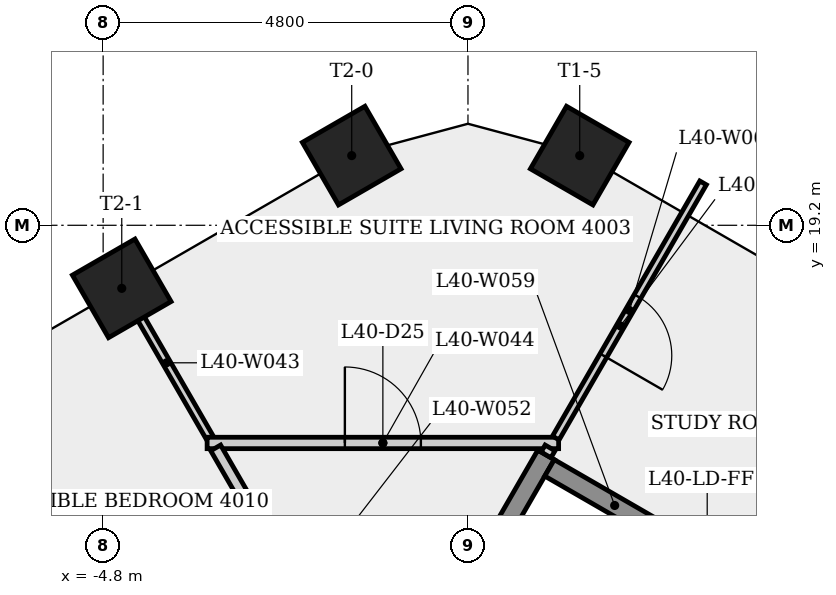
"""IFC4 building model, lengths in metres.
Left out: names, types, materials, properties, quantities, classifications, styles, units other than length and angle.
Written with IfcOpenShell. Run it as: python <this file> out.ifc"""

import sys

from ifc_helpers import new_model, si_unit, direction, frame, frame_2d, origin, origin_2d, place, context, subcontext, project, spatial, rectangle, extrude, element, fill, save


model = new_model("IFC4")
c1 = context("Model", 3, precision=1e-05, world=origin(), true_north=direction((0.0, 1.0)))
c2 = subcontext(c1, "Body", "Model", "MODEL_VIEW")
j1 = project(units=[si_unit("LENGTHUNIT", "METRE"), si_unit("PLANEANGLEUNIT", "RADIAN")], contexts=[c1])
p1 = place(None, origin())
s1 = spatial("IfcSite", under=j1, at=p1, CompositionType="ELEMENT")
p2 = place(p1, origin())
s2 = spatial("IfcBuilding", under=s1, at=p2, CompositionType="ELEMENT")
p3 = place(p2, frame((0.0, 0.0, 152.7)))
s3 = spatial("IfcBuildingStorey", under=s2, at=p3, CompositionType="ELEMENT", Elevation=152.7)
for number, where, z_axis, x_axis in (
    (1, (1.47, 20.117, 0.0), (0.0, 0.0, 1.0), (0.5, 0.866, 0.0)),
    (2, (-1.53, 20.117, 0.0), (0.0, 0.0, 1.0), (-0.5, 0.866, 0.0)),
    (3, (-4.555, 18.37, 0.0), (0.0, 0.0, 1.0), (-0.5, 0.866, 0.0)),
):
    element("IfcColumn", number, at=place(p3, frame(where, z_axis=z_axis, x_axis=x_axis)), inside=s3, PredefinedType="COLUMN", context=c2, shape_type="SweptSolid", body=[
        extrude(rectangle(XDim=0.95, YDim=0.95, at=origin_2d()), origin(), (0.0, 0.0, 1.0), 3.4),
    ])
p4 = place(p3, frame((-7.575, 16.627, 0.0), z_axis=(0.0, 0.0, 1.0), x_axis=(0.500011399757, -0.866018822032, 0.0)))
e4 = element("IfcWall", 4, at=p4, inside=s3, PredefinedType="PARTITIONING", context=c2, shape_type="SweptSolid", body=[
    extrude(rectangle(XDim=7.411, YDim=0.1, at=frame_2d((3.706, 0.0))), origin(), (0.0, 0.0, 1.0), 3.05),
])
p5 = place(p3, frame((-3.394, 16.401, 0.0), z_axis=(0.0, 0.0, 1.0), x_axis=(-0.500067608328, 0.865986366579, 0.0)))
e5 = element("IfcWall", 5, at=p5, inside=s3, PredefinedType="PARTITIONING", context=c2, shape_type="SweptSolid", body=[
    extrude(rectangle(XDim=2.286, YDim=0.1, at=frame_2d((1.143, 0.0))), origin(), (0.0, 0.0, 1.0), 3.05),
])
p6 = place(p3, frame((-3.432, 16.336, 0.0), z_axis=(0.0, 0.0, 1.0), x_axis=(1.0, 0.0, 0.0)))
e6 = element("IfcWall", 6, at=p6, inside=s3, PredefinedType="PARTITIONING", context=c2, shape_type="SweptSolid", body=[
    extrude(rectangle(XDim=4.625, YDim=0.15, at=frame_2d((2.312, 0.0))), origin(), (0.0, 0.0, 1.0), 3.05),
])
p7 = place(p6, frame((1.812, 0.0, 0.0)))
e7 = element("IfcOpeningElement", 7, at=p7, cuts=e6, PredefinedType="OPENING", context=c2, shape_type="SweptSolid", body=[
    extrude(rectangle(XDim=1.0, YDim=2.1, at=frame_2d((0.5, 1.05))), frame((0.0, 0.085, 0.0), z_axis=(0.0, -1.0, 0.0), x_axis=(1.0, 0.0, 0.0)), (0.0, 0.0, 1.0), 0.17),
])
p8 = place(p3, frame((-1.12, 12.461, 0.0), z_axis=(0.0, 0.0, 1.0), x_axis=(-0.499970631935, 0.866042358781, 0.0)))
e8 = element("IfcWall", 8, at=p8, inside=s3, PredefinedType="PARTITIONING", context=c2, shape_type="SweptSolid", body=[
    extrude(rectangle(XDim=4.4, YDim=0.15, at=frame_2d((2.2, 0.0))), origin(), (0.0, 0.0, 1.0), 3.05),
])
p9 = place(p8, frame((1.75, 0.0, 0.0)))
e9 = element("IfcOpeningElement", 9, at=p9, cuts=e8, PredefinedType="OPENING", context=c2, shape_type="SweptSolid", body=[
    extrude(rectangle(XDim=0.9, YDim=2.1, at=frame_2d((0.45, 1.05))), frame((0.0, 0.085, 0.0), z_axis=(0.0, -1.0, 0.0), x_axis=(1.0, 0.0, 0.0)), (0.0, 0.0, 1.0), 0.17),
])
p10 = place(p3, frame((-0.448, 13.624, 0.0), z_axis=(0.0, 0.0, 1.0), x_axis=(0.500037662692, 0.866003658127, 0.0)))
e10 = element("IfcWall", 10, at=p10, inside=s3, PredefinedType="SHEAR", context=c2, shape_type="SweptSolid", body=[
    extrude(rectangle(XDim=2.95, YDim=0.25, at=frame_2d((1.475, 0.0))), origin(), (0.0, 0.0, 1.0), 3.05),
])
p11 = place(p3, frame((1.073, 16.008, 0.0), z_axis=(0.0, 0.0, 1.0), x_axis=(0.866040211805, -0.499974350878, 0.0)))
e11 = element("IfcWall", 11, at=p11, inside=s3, PredefinedType="SHEAR", context=c2, shape_type="SweptSolid", body=[
    extrude(rectangle(XDim=3.3, YDim=0.25, at=frame_2d((1.65, 0.0))), origin(), (0.0, 0.0, 1.0), 3.05),
])
p12 = place(p3, frame((1.08, 16.271, 0.0), z_axis=(0.0, 0.0, 1.0), x_axis=(-0.498859801958, -0.86668269741, 0.0)))
e12 = element("IfcWall", 12, at=p12, inside=s3, PredefinedType="PARTITIONING", context=c2, shape_type="SweptSolid", body=[
    extrude(rectangle(XDim=0.106, YDim=0.15, at=frame_2d((0.053, 0.0))), origin(), (0.0, 0.0, 1.0), 3.05),
])
p13 = place(p3, frame((3.094, 19.758, 0.0), z_axis=(0.0, 0.0, 1.0), x_axis=(-0.500020491252, -0.866013572832, 0.0)))
e13 = element("IfcWall", 13, at=p13, inside=s3, PredefinedType="PARTITIONING", context=c2, shape_type="SweptSolid", body=[
    extrude(rectangle(XDim=3.876, YDim=0.1, at=frame_2d((1.938, 0.0))), origin(), (0.0, 0.0, 1.0), 3.05),
])
p14 = place(p13, frame((1.724, 0.0, 0.0)))
e14 = element("IfcOpeningElement", 14, at=p14, cuts=e13, PredefinedType="OPENING", context=c2, shape_type="SweptSolid", body=[
    extrude(rectangle(XDim=0.9, YDim=2.1, at=frame_2d((0.45, 1.05))), frame((0.0, 0.06, 0.0), z_axis=(0.0, -1.0, 0.0), x_axis=(1.0, 0.0, 0.0)), (0.0, 0.0, 1.0), 0.12),
])
p15 = place(p7, origin())
e15 = element("IfcDoor", 15, at=p15, inside=s3, OperationType="SINGLE_SWING_LEFT", PredefinedType="DOOR", context=c2, shape_type="SweptSolid", body=[
    extrude(rectangle(XDim=1.0, YDim=2.1, at=frame_2d((0.5, 1.05))), frame((0.0, 0.025, 0.0), z_axis=(0.0, -1.0, 0.0), x_axis=(1.0, 0.0, 0.0)), (0.0, 0.0, 1.0), 0.05),
])
fill(e7, e15)
p16 = place(p14, origin())
e16 = element("IfcDoor", 16, at=p16, inside=s3, OperationType="SINGLE_SWING_RIGHT", PredefinedType="DOOR", context=c2, shape_type="SweptSolid", body=[
    extrude(rectangle(XDim=0.9, YDim=2.1, at=frame_2d((0.45, 1.05))), frame((0.0, 0.025, 0.0), z_axis=(0.0, -1.0, 0.0), x_axis=(1.0, 0.0, 0.0)), (0.0, 0.0, 1.0), 0.05),
])
fill(e14, e16)
save(model, sys.argv[1])
